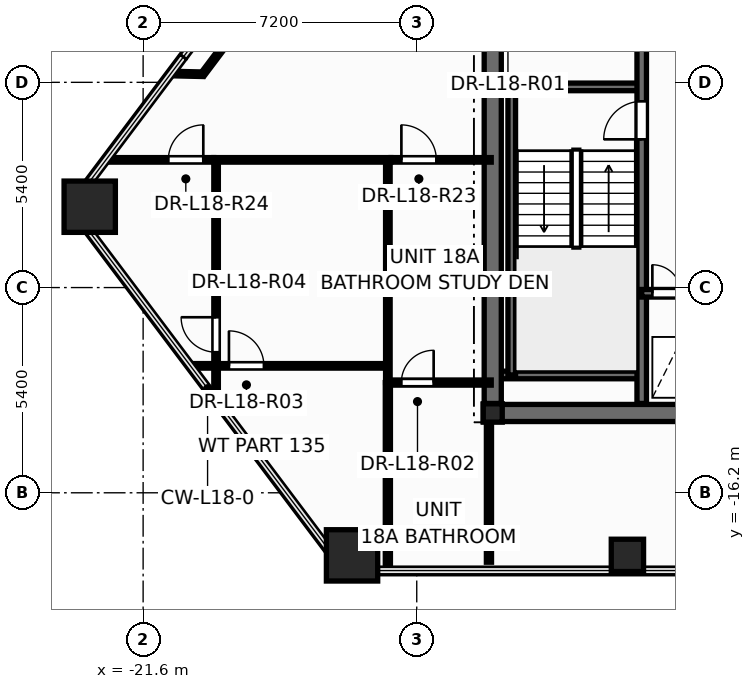
"""IFC4 building model, lengths in metres.
Left out: names, types, materials, properties, quantities, classifications, styles, units other than length and angle.
Written with IfcOpenShell. Run it as: python <this file> out.ifc"""

import sys

from ifc_helpers import new_model, si_unit, direction, frame, frame_2d, origin, origin_2d, place, context, subcontext, project, spatial, rectangle, hollow_rectangle, hollow_circle, i_section, extrude, element, fill, save


model = new_model("IFC4")
c1 = context("Model", 3, precision=1e-05, world=origin(), true_north=direction((0.0, 1.0)))
c2 = subcontext(c1, "Body", "Model", "MODEL_VIEW")
j1 = project(units=[si_unit("LENGTHUNIT", "METRE"), si_unit("PLANEANGLEUNIT", "RADIAN")], contexts=[c1])
p1 = place(None, origin())
s1 = spatial("IfcSite", under=j1, at=p1, CompositionType="ELEMENT")
p2 = place(p1, origin())
s2 = spatial("IfcBuilding", under=s1, at=p2, CompositionType="ELEMENT")
p3 = place(p2, frame((0.0, 0.0, 72.0)))
s3 = spatial("IfcBuildingStorey", under=s2, at=p3, CompositionType="ELEMENT", Elevation=72.0)
for number, where, z_axis, x_axis in (
    (1, (-23.005, -8.673, 0.0), (0.0, 0.0, 1.0), (1.0, 0.0, 0.0)),
    (2, (-16.103, -17.847, 0.0), (0.0, 0.0, 1.0), (1.0, 0.0, 0.0)),
):
    element("IfcColumn", number, at=place(p3, frame(where, z_axis=z_axis, x_axis=x_axis)), inside=s3, PredefinedType="COLUMN", context=c2, shape_type="SweptSolid", body=[
        extrude(hollow_rectangle(XDim=1.35, YDim=1.35, WallThickness=0.065, at=origin_2d()), origin(), (0.0, 0.0, 1.0), 3.6),
    ])
p4 = place(p3, frame((-8.856, -17.847, 0.0), z_axis=(0.0, 0.0, 1.0), x_axis=(1.0, 0.0, 0.0)))
e3 = element("IfcColumn", 3, at=p4, inside=s3, PredefinedType="COLUMN", context=c2, shape_type="SweptSolid", body=[
    extrude(hollow_circle(Radius=0.425, WallThickness=0.038, at=origin_2d()), origin(), (0.0, 0.0, 1.0), 3.6),
])
p5 = place(p3, frame((-12.4, -14.1, 0.0), z_axis=(0.0, 0.0, 1.0), x_axis=(1.0, 0.0, 0.0)))
e4 = element("IfcColumn", 4, at=p5, inside=s3, PredefinedType="COLUMN", context=c2, shape_type="SweptSolid", body=[
    extrude(i_section(OverallWidth=0.5, OverallDepth=0.482, WebThickness=0.04, FlangeThickness=0.045, at=origin_2d()), origin(), (0.0, 0.0, 1.0), 3.6),
])
p6 = place(p3, frame((-12.65, -14.1, 0.0), z_axis=(0.0, 0.0, 1.0), x_axis=(1.0, 0.0, 0.0)))
e5 = element("IfcWall", 5, at=p6, inside=s3, PredefinedType="SHEAR", context=c2, shape_type="SweptSolid", body=[
    extrude(rectangle(XDim=25.3, YDim=0.45, at=frame_2d((12.65, 0.0))), origin(), (0.0, 0.0, 1.0), 3.6),
])
for number, where, z_axis, x_axis in (
    (6, (-12.35, -5.52, 0.0), (0.0, 0.0, 1.0), (1.0, 0.0, 0.0)),
    (7, (-12.35, -13.1, 0.0), (0.0, 0.0, 1.0), (1.0, 0.0, 0.0)),
):
    element("IfcWall", number, at=place(p3, frame(where, z_axis=z_axis, x_axis=x_axis)), inside=s3, PredefinedType="SOLIDWALL", context=c2, shape_type="SweptSolid", body=[
        extrude(rectangle(XDim=3.87, YDim=0.2, at=frame_2d((1.935, 0.0))), origin(), (0.0, 0.0, 1.0), 3.6),
    ])
p7 = place(p3, frame((-11.9, -13.1, 0.0), z_axis=(0.0, 0.0, 1.0), x_axis=(0.0, 1.0, 0.0)))
e8 = element("IfcWall", 8, at=p7, inside=s3, PredefinedType="SOLIDWALL", context=c2, shape_type="SweptSolid", body=[
    extrude(rectangle(XDim=7.58, YDim=0.2, at=frame_2d((3.79, 0.0))), origin(), (0.0, 0.0, 1.0), 3.6),
])
p8 = place(p3, frame((-8.48, -13.85, 0.0), z_axis=(0.0, 0.0, 1.0), x_axis=(0.0, 1.0, 0.0)))
e9 = element("IfcWall", 9, at=p8, inside=s3, PredefinedType="SHEAR", context=c2, shape_type="SweptSolid", body=[
    extrude(rectangle(XDim=9.4, YDim=0.25, at=frame_2d((4.7, 0.0))), origin(), (0.0, 0.0, 1.0), 3.6),
])
p9 = place(p8, frame((6.95, 0.0, 0.0)))
e10 = element("IfcOpeningElement", 10, at=p9, cuts=e9, PredefinedType="OPENING", context=c2, shape_type="SweptSolid", body=[
    extrude(rectangle(XDim=1.006, YDim=2.104, at=frame_2d((0.5, 1.052))), frame((0.0, 0.135, 0.0), z_axis=(0.0, -1.0, 0.0), x_axis=(1.0, 0.0, 0.0)), (0.0, 0.0, 1.0), 0.27),
])
p10 = place(p3, frame((-8.48, -10.95, 0.0), z_axis=(0.0, 0.0, 1.0), x_axis=(1.0, 0.0, 0.0)))
e11 = element("IfcWall", 11, at=p10, inside=s3, PredefinedType="SOLIDWALL", context=c2, shape_type="SweptSolid", body=[
    extrude(rectangle(XDim=3.36, YDim=0.2, at=frame_2d((1.68, 0.0))), origin(), (0.0, 0.0, 1.0), 3.6),
])
p11 = place(p10, frame((0.28, 0.0, 0.0)))
e12 = element("IfcOpeningElement", 12, at=p11, cuts=e11, PredefinedType="OPENING", context=c2, shape_type="SweptSolid", body=[
    extrude(rectangle(XDim=0.756, YDim=2.054, at=frame_2d((0.375, 1.027))), frame((0.0, 0.11, 0.0), z_axis=(0.0, -1.0, 0.0), x_axis=(1.0, 0.0, 0.0)), (0.0, 0.0, 1.0), 0.22),
])
p12 = place(p10, frame((1.85, 0.0, 0.0)))
e13 = element("IfcOpeningElement", 13, at=p12, cuts=e11, PredefinedType="OPENING", context=c2, shape_type="SweptSolid", body=[
    extrude(rectangle(XDim=1.106, YDim=2.104, at=frame_2d((0.55, 1.052))), frame((0.0, 0.11, 0.0), z_axis=(0.0, -1.0, 0.0), x_axis=(1.0, 0.0, 0.0)), (0.0, 0.0, 1.0), 0.22),
])
p13 = place(p3, frame((-12.4, -13.85, 0.0), z_axis=(0.0, 0.0, 1.0), x_axis=(0.0, 1.0, 0.0)))
e14 = element("IfcWall", 14, at=p13, inside=s3, PredefinedType="SHEAR", context=c2, shape_type="SweptSolid", body=[
    extrude(rectangle(XDim=9.4, YDim=0.45, at=frame_2d((4.7, 0.0))), origin(), (0.0, 0.0, 1.0), 3.6),
])
p14 = place(p3, frame((-19.68, -13.757, 0.0), z_axis=(0.0, 0.0, 1.0), x_axis=(0.0, 1.0, 0.0)))
e15 = element("IfcWall", 15, at=p14, inside=s3, PredefinedType="PARTITIONING", context=c2, shape_type="SweptSolid", body=[
    extrude(rectangle(XDim=6.317, YDim=0.12, at=frame_2d((3.159, 0.0))), origin(), (0.0, 0.0, 1.0), 2.325),
])
p15 = place(p14, frame((1.256, 0.0, 0.0)))
e16 = element("IfcOpeningElement", 16, at=p15, cuts=e15, PredefinedType="OPENING", context=c2, shape_type="SweptSolid", body=[
    extrude(rectangle(XDim=0.926, YDim=2.104, at=frame_2d((0.46, 1.052))), frame((0.0, 0.07, 0.0), z_axis=(0.0, -1.0, 0.0), x_axis=(1.0, 0.0, 0.0)), (0.0, 0.0, 1.0), 0.14),
])
p16 = place(p3, frame((-15.16, -13.3, 0.0), z_axis=(0.0, 0.0, 1.0), x_axis=(0.0, 1.0, 0.0)))
e17 = element("IfcWall", 17, at=p16, inside=s3, PredefinedType="PARTITIONING", context=c2, shape_type="SweptSolid", body=[
    extrude(rectangle(XDim=5.86, YDim=0.12, at=frame_2d((2.93, 0.0))), origin(), (0.0, 0.0, 1.0), 3.35),
])
p17 = place(p3, frame((-20.355, -12.86, 0.0), z_axis=(0.0, 0.0, 1.0), x_axis=(1.0, 0.0, 0.0)))
e18 = element("IfcWall", 18, at=p17, inside=s3, PredefinedType="PARTITIONING", context=c2, shape_type="SweptSolid", body=[
    extrude(rectangle(XDim=5.195, YDim=0.12, at=frame_2d((2.598, 0.0))), origin(), (0.0, 0.0, 1.0), 2.713),
])
p18 = place(p17, frame((1.014, 0.0, 0.0)))
e19 = element("IfcOpeningElement", 19, at=p18, cuts=e18, PredefinedType="OPENING", context=c2, shape_type="SweptSolid", body=[
    extrude(rectangle(XDim=0.926, YDim=2.104, at=frame_2d((0.46, 1.052))), frame((0.0, 0.07, 0.0), z_axis=(0.0, -1.0, 0.0), x_axis=(1.0, 0.0, 0.0)), (0.0, 0.0, 1.0), 0.14),
])
p19 = place(p3, frame((-15.16, -18.247, 0.0), z_axis=(0.0, 0.0, 1.0), x_axis=(0.0, 1.0, 0.0)))
e20 = element("IfcWall", 20, at=p19, inside=s3, PredefinedType="PARTITIONING", context=c2, shape_type="SweptSolid", body=[
    extrude(rectangle(XDim=4.947, YDim=0.135, at=frame_2d((2.473, 0.0))), origin(), (0.0, 0.0, 1.0), 2.713),
])
p20 = place(p3, frame((-19.74, -7.44, 0.0), z_axis=(0.0, 0.0, 1.0), x_axis=(1.0, 0.0, 0.0)))
e21 = element("IfcWall", 21, at=p20, inside=s3, PredefinedType="PARTITIONING", context=c2, shape_type="SweptSolid", body=[
    extrude(rectangle(XDim=4.66, YDim=0.12, at=frame_2d((2.33, 0.0))), origin(), (0.0, 0.0, 1.0), 2.325),
])
p21 = place(p3, frame((-22.578, -7.44, 0.0), z_axis=(0.0, 0.0, 1.0), x_axis=(1.0, 0.0, 0.0)))
e22 = element("IfcWall", 22, at=p21, inside=s3, PredefinedType="PARTITIONING", context=c2, shape_type="SweptSolid", body=[
    extrude(rectangle(XDim=2.836, YDim=0.12, at=frame_2d((1.418, 0.0))), origin(), (0.0, 0.0, 1.0), 2.325),
])
p22 = place(p21, frame((1.642, 0.0, 0.0)))
e23 = element("IfcOpeningElement", 23, at=p22, cuts=e22, PredefinedType="OPENING", context=c2, shape_type="SweptSolid", body=[
    extrude(rectangle(XDim=0.926, YDim=2.104, at=frame_2d((0.46, 1.052))), frame((0.0, 0.07, 0.0), z_axis=(0.0, -1.0, 0.0), x_axis=(1.0, 0.0, 0.0)), (0.0, 0.0, 1.0), 0.14),
])
p23 = place(p3, frame((-15.078, -7.44, 0.0), z_axis=(0.0, 0.0, 1.0), x_axis=(1.0, 0.0, 0.0)))
e24 = element("IfcWall", 24, at=p23, inside=s3, PredefinedType="PARTITIONING", context=c2, shape_type="SweptSolid", body=[
    extrude(rectangle(XDim=2.638, YDim=0.12, at=frame_2d((1.319, 0.0))), origin(), (0.0, 0.0, 1.0), 2.713),
])
p24 = place(p23, frame((0.274, 0.0, 0.0)))
e25 = element("IfcOpeningElement", 25, at=p24, cuts=e24, PredefinedType="OPENING", context=c2, shape_type="SweptSolid", body=[
    extrude(rectangle(XDim=0.926, YDim=2.104, at=frame_2d((0.46, 1.052))), frame((0.0, 0.07, 0.0), z_axis=(0.0, -1.0, 0.0), x_axis=(1.0, 0.0, 0.0)), (0.0, 0.0, 1.0), 0.14),
])
p25 = place(p3, frame((-15.16, -13.3, 0.0), z_axis=(0.0, 0.0, 1.0), x_axis=(1.0, 0.0, 0.0)))
e26 = element("IfcWall", 26, at=p25, inside=s3, PredefinedType="PARTITIONING", context=c2, shape_type="SweptSolid", body=[
    extrude(rectangle(XDim=2.72, YDim=0.135, at=frame_2d((1.36, 0.0))), origin(), (0.0, 0.0, 1.0), 2.713),
])
p26 = place(p25, frame((0.355, 0.0, 0.0)))
e27 = element("IfcOpeningElement", 27, at=p26, cuts=e26, PredefinedType="OPENING", context=c2, shape_type="SweptSolid", body=[
    extrude(rectangle(XDim=0.856, YDim=2.104, at=frame_2d((0.425, 1.052))), frame((0.0, 0.078, 0.0), z_axis=(0.0, -1.0, 0.0), x_axis=(1.0, 0.0, 0.0)), (0.0, 0.0, 1.0), 0.155),
])
p27 = place(p3, frame((-18.662, -3.366, 0.0), z_axis=(0.0, 0.0, 1.0), x_axis=(-0.601301632327, -0.799022119194, 0.0)))
e28 = element("IfcWall", 28, at=p27, inside=s3, PredefinedType="PARTITIONING", context=c2, shape_type="SweptSolid", body=[
    extrude(rectangle(XDim=2.279, YDim=0.12, at=frame_2d((1.14, 0.0))), origin(), (0.0, 0.0, 1.0), 3.35),
])
p28 = place(p3, frame((-20.032, -5.187, 0.0), z_axis=(0.0, 0.0, 1.0), x_axis=(-0.999739997708, 0.022802126725, 0.0)))
e29 = element("IfcWall", 29, at=p28, inside=s3, PredefinedType="PARTITIONING", context=c2, shape_type="SweptSolid", body=[
    extrude(rectangle(XDim=0.824, YDim=0.12, at=frame_2d((0.412, 0.0))), origin(), (0.0, 0.0, 1.0), 2.713),
])
p29 = place(p3, frame((-12.5, -14.4, 0.0), z_axis=(0.0, 0.0, 1.0), x_axis=(0.0, -1.0, 0.0)))
e30 = element("IfcWall", 30, at=p29, inside=s3, PredefinedType="PARTITIONING", context=c2, shape_type="SweptSolid", body=[
    extrude(rectangle(XDim=3.627, YDim=0.135, at=frame_2d((1.813, 0.0))), origin(), (0.0, 0.0, 1.0), 2.713),
])
p30 = place(p9, origin())
e31 = element("IfcDoor", 31, at=p30, inside=s3, OperationType="SINGLE_SWING_LEFT", PredefinedType="DOOR", context=c2, shape_type="SweptSolid", body=[
    extrude(rectangle(XDim=1.0, YDim=2.1, at=frame_2d((0.5, 1.05))), frame((0.0, 0.025, 0.0), z_axis=(0.0, -1.0, 0.0), x_axis=(1.0, 0.0, 0.0)), (0.0, 0.0, 1.0), 0.05),
])
fill(e10, e31)
p31 = place(p11, origin())
e32 = element("IfcDoor", 32, at=p31, inside=s3, OperationType="SINGLE_SWING_LEFT", PredefinedType="DOOR", context=c2, shape_type="SweptSolid", body=[
    extrude(rectangle(XDim=0.75, YDim=2.05, at=frame_2d((0.375, 1.025))), frame((0.0, 0.025, 0.0), z_axis=(0.0, -1.0, 0.0), x_axis=(1.0, 0.0, 0.0)), (0.0, 0.0, 1.0), 0.05),
])
fill(e12, e32)
p32 = place(p26, origin())
e33 = element("IfcDoor", 33, at=p32, inside=s3, OperationType="SINGLE_SWING_RIGHT", PredefinedType="DOOR", context=c2, shape_type="SweptSolid", body=[
    extrude(rectangle(XDim=0.85, YDim=2.1, at=frame_2d((0.425, 1.05))), frame((0.0, 0.025, 0.0), z_axis=(0.0, -1.0, 0.0), x_axis=(1.0, 0.0, 0.0)), (0.0, 0.0, 1.0), 0.05),
])
fill(e27, e33)
p33 = place(p18, origin())
e34 = element("IfcDoor", 34, at=p33, inside=s3, OperationType="SINGLE_SWING_LEFT", PredefinedType="DOOR", context=c2, shape_type="SweptSolid", body=[
    extrude(rectangle(XDim=0.92, YDim=2.1, at=frame_2d((0.46, 1.05))), frame((0.0, 0.025, 0.0), z_axis=(0.0, -1.0, 0.0), x_axis=(1.0, 0.0, 0.0)), (0.0, 0.0, 1.0), 0.05),
])
fill(e19, e34)
p34 = place(p15, origin())
e35 = element("IfcDoor", 35, at=p34, inside=s3, OperationType="SINGLE_SWING_RIGHT", PredefinedType="DOOR", context=c2, shape_type="SweptSolid", body=[
    extrude(rectangle(XDim=0.92, YDim=2.1, at=frame_2d((0.46, 1.05))), frame((0.0, 0.025, 0.0), z_axis=(0.0, -1.0, 0.0), x_axis=(1.0, 0.0, 0.0)), (0.0, 0.0, 1.0), 0.05),
])
fill(e16, e35)
p35 = place(p24, origin())
e36 = element("IfcDoor", 36, at=p35, inside=s3, OperationType="SINGLE_SWING_LEFT", PredefinedType="DOOR", context=c2, shape_type="SweptSolid", body=[
    extrude(rectangle(XDim=0.92, YDim=2.1, at=frame_2d((0.46, 1.05))), frame((0.0, 0.025, 0.0), z_axis=(0.0, -1.0, 0.0), x_axis=(1.0, 0.0, 0.0)), (0.0, 0.0, 1.0), 0.05),
])
fill(e25, e36)
p36 = place(p22, origin())
e37 = element("IfcDoor", 37, at=p36, inside=s3, OperationType="SINGLE_SWING_RIGHT", PredefinedType="DOOR", context=c2, shape_type="SweptSolid", body=[
    extrude(rectangle(XDim=0.92, YDim=2.1, at=frame_2d((0.46, 1.05))), frame((0.0, 0.025, 0.0), z_axis=(0.0, -1.0, 0.0), x_axis=(1.0, 0.0, 0.0)), (0.0, 0.0, 1.0), 0.05),
])
fill(e23, e37)
save(model, sys.argv[1])
